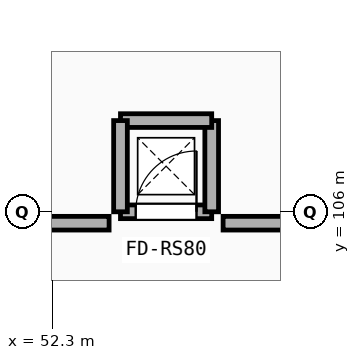
"""IFC4 building model, lengths in metres.
Left out: names, types, materials, properties, quantities, classifications, styles, units other than length and angle.
Written with IfcOpenShell. Run it as: python <this file> out.ifc"""

import sys

from ifc_helpers import new_model, si_unit, direction, frame, frame_2d, origin, place, context, subcontext, project, spatial, rectangle, extrude, element, fill, save


model = new_model("IFC4")
c1 = context("Model", 3, precision=1e-05, world=origin(), true_north=direction((0.0, 1.0)))
c2 = subcontext(c1, "Body", "Model", "MODEL_VIEW")
j1 = project(units=[si_unit("LENGTHUNIT", "METRE"), si_unit("PLANEANGLEUNIT", "RADIAN")], contexts=[c1])
p1 = place(None, origin())
s1 = spatial("IfcSite", under=j1, at=p1, CompositionType="ELEMENT")
p2 = place(p1, origin())
s2 = spatial("IfcBuilding", under=s1, at=p2, CompositionType="ELEMENT")
p3 = place(p2, frame((0.0, 0.0, 13.8)))
s3 = spatial("IfcBuildingStorey", under=s2, at=p3, CompositionType="ELEMENT", Elevation=13.8)
p4 = place(p3, frame((35.35, 105.85, 0.0), z_axis=(0.0, 0.0, 1.0), x_axis=(1.0, 0.0, 0.0)))
e1 = element("IfcWall", 1, at=p4, inside=s3, PredefinedType="PARTITIONING", context=c2, shape_type="SweptSolid", body=[
    extrude(rectangle(XDim=17.7, YDim=0.18, at=frame_2d((8.85, 0.0))), origin(), (0.0, 0.0, 1.0), 3.15),
])
p5 = place(p3, frame((54.55, 105.85, 0.0), z_axis=(0.0, 0.0, 1.0), x_axis=(1.0, 0.0, 0.0)))
e2 = element("IfcWall", 2, at=p5, inside=s3, PredefinedType="PARTITIONING", context=c2, shape_type="SweptSolid", body=[
    extrude(rectangle(XDim=5.75, YDim=0.18, at=frame_2d((2.875, 0.0))), origin(), (0.0, 0.0, 1.0), 3.15),
])
p6 = place(p3, frame((53.2, 106.0, 0.0), z_axis=(0.0, 0.0, 1.0), x_axis=(1.0, 0.0, 0.0)))
e3 = element("IfcWall", 3, at=p6, inside=s3, PredefinedType="SOLIDWALL", context=c2, shape_type="SweptSolid", body=[
    extrude(rectangle(XDim=1.2, YDim=0.18, at=frame_2d((0.6, 0.0))), origin(), (0.0, 0.0, 1.0), 3.69),
])
p7 = place(p6, frame((0.2, 0.0, -0.01)))
e4 = element("IfcOpeningElement", 4, at=p7, cuts=e3, PredefinedType="OPENING", context=c2, shape_type="SweptSolid", body=[
    extrude(rectangle(XDim=0.8, YDim=2.06, at=frame_2d((0.4, 1.03))), frame((0.0, 0.1, 0.0), z_axis=(0.0, -1.0, 0.0), x_axis=(1.0, 0.0, 0.0)), (0.0, 0.0, 1.0), 0.2),
])
for number, where, z_axis, x_axis in (
    (5, (54.4, 106.0, 0.0), (0.0, 0.0, 1.0), (0.0, 1.0, 0.0)),
    (6, (54.4, 107.2, 0.0), (0.0, 0.0, 1.0), (-1.0, 0.0, 0.0)),
    (7, (53.2, 107.2, 0.0), (0.0, 0.0, 1.0), (0.0, -1.0, 0.0)),
):
    element("IfcWall", number, at=place(p3, frame(where, z_axis=z_axis, x_axis=x_axis)), inside=s3, PredefinedType="SOLIDWALL", context=c2, shape_type="SweptSolid", body=[
        extrude(rectangle(XDim=1.2, YDim=0.18, at=frame_2d((0.6, 0.0))), origin(), (0.0, 0.0, 1.0), 3.69),
    ])
p8 = place(p7, frame((0.0, 0.0, 0.01)))
e8 = element("IfcDoor", 8, at=p8, inside=s3, OperationType="SINGLE_SWING_RIGHT", PredefinedType="DOOR", context=c2, shape_type="SweptSolid", body=[
    extrude(rectangle(XDim=0.8, YDim=2.05, at=frame_2d((0.4, 1.025))), frame((0.0, 0.025, 0.0), z_axis=(0.0, -1.0, 0.0), x_axis=(1.0, 0.0, 0.0)), (0.0, 0.0, 1.0), 0.05),
])
fill(e4, e8)
save(model, sys.argv[1])
